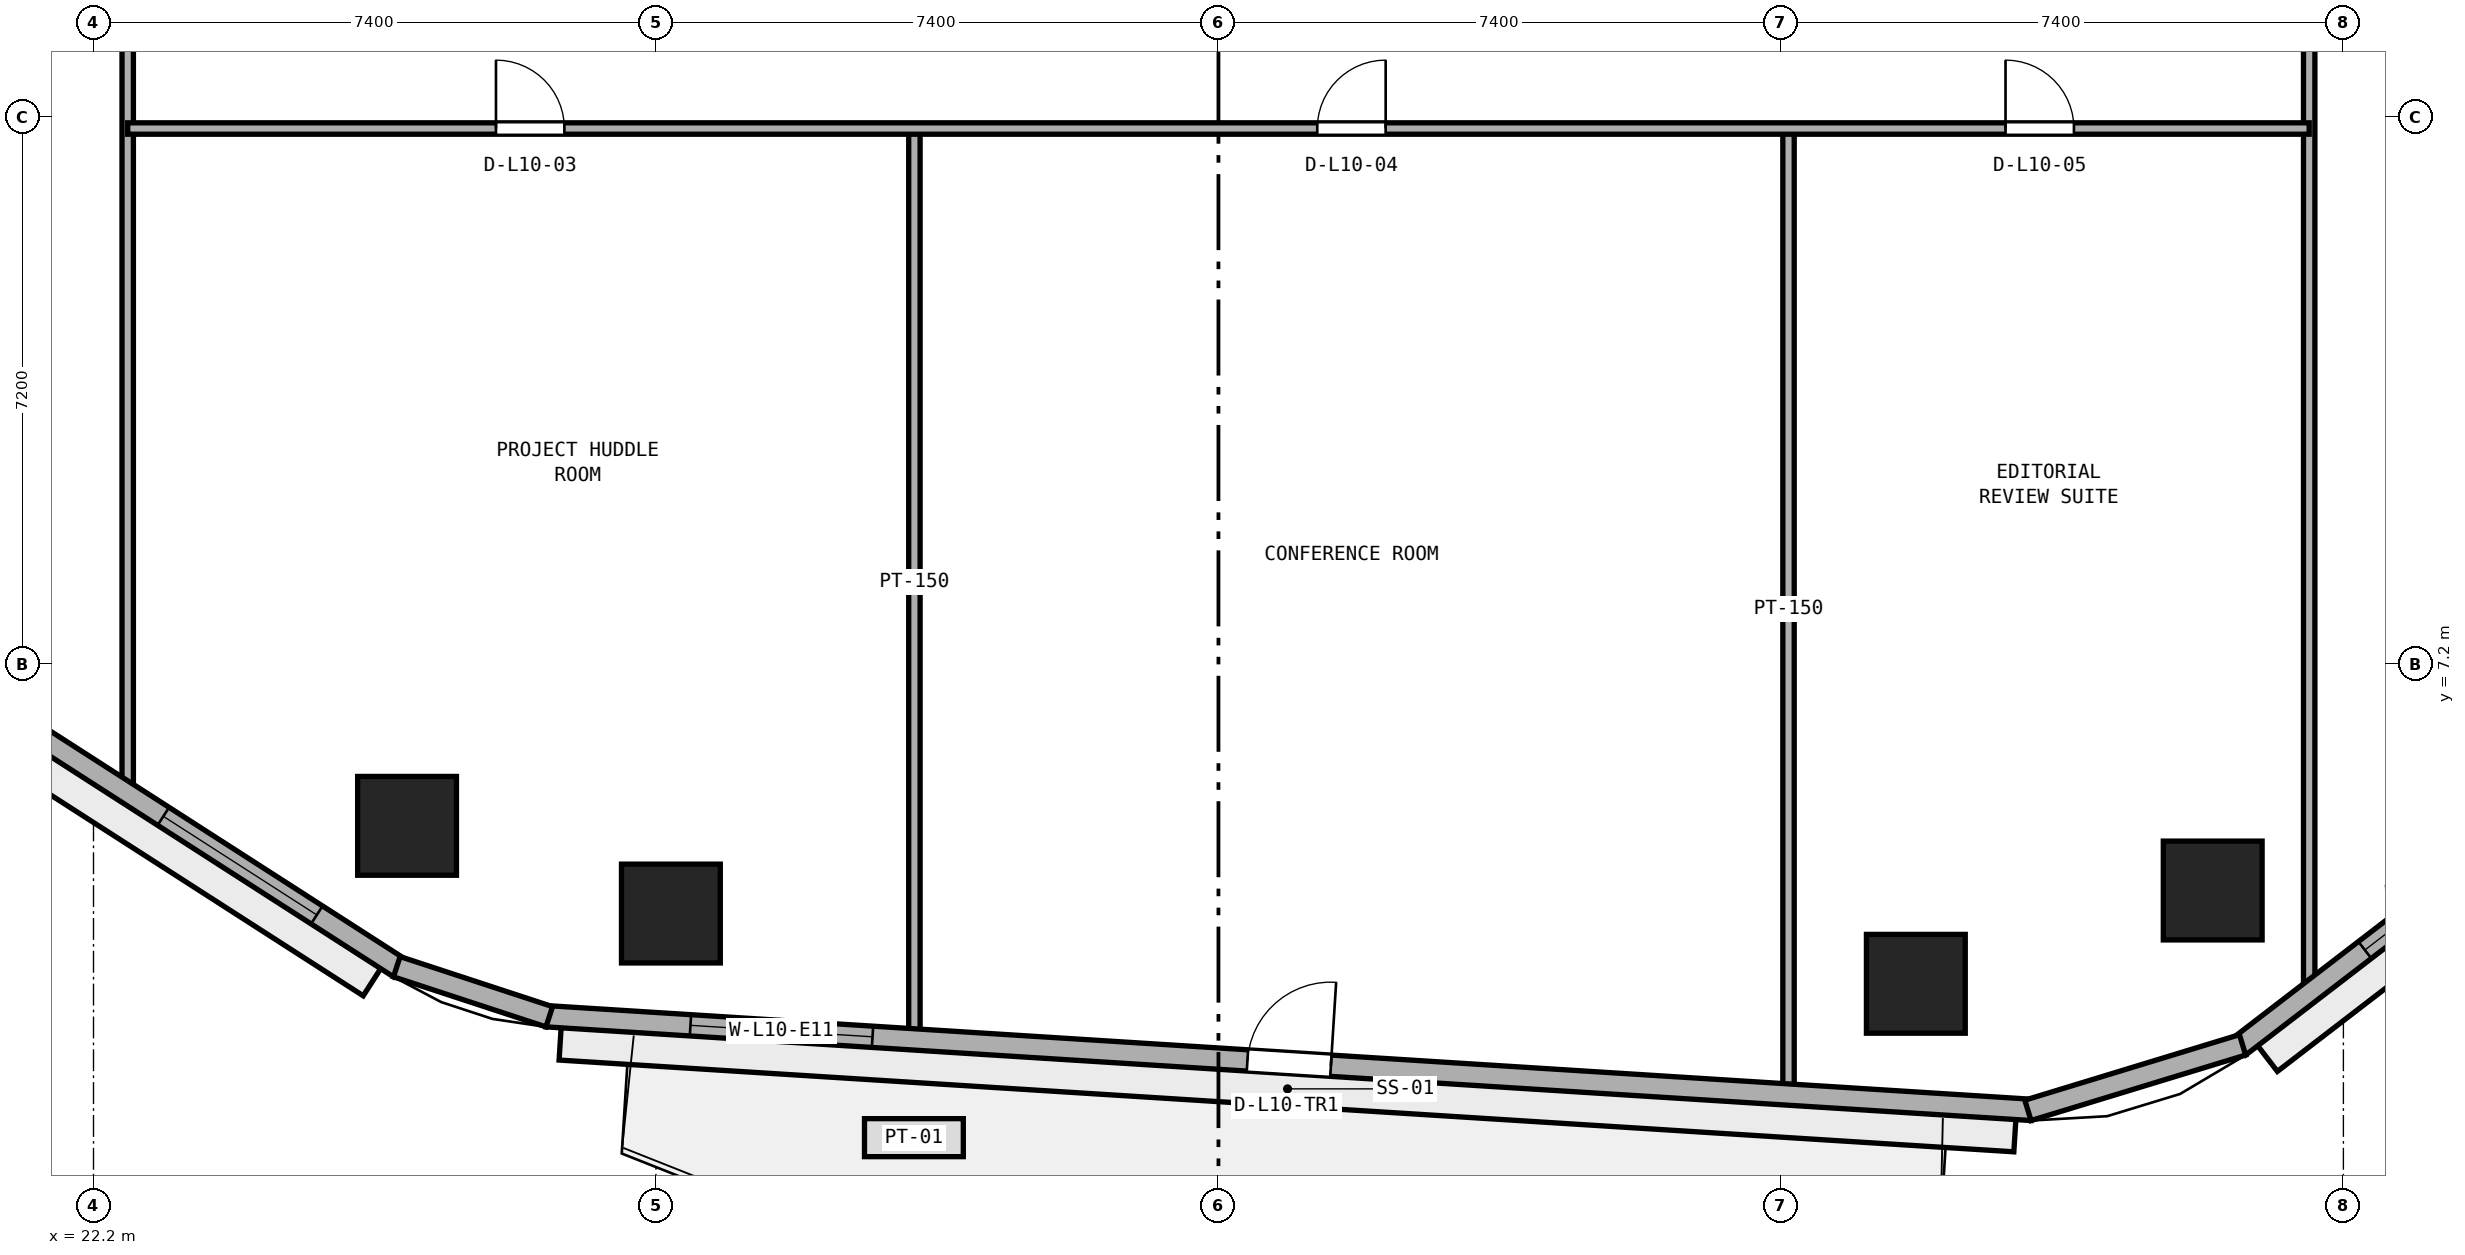
"""IFC4 building model, lengths in metres.
Left out: names, types, materials, properties, quantities, classifications, styles, units other than length and angle.
Written with IfcOpenShell. Run it as: python <this file> out.ifc"""

import sys

from ifc_helpers import new_model, si_unit, direction, frame, frame_2d, origin, origin_2d, place, context, subcontext, project, spatial, rectangle, extrude, element, fill, save


model = new_model("IFC4")
c1 = context("Model", 3, precision=1e-05, world=origin(), true_north=direction((0.0, 1.0)))
c2 = subcontext(c1, "Body", "Model", "MODEL_VIEW")
j1 = project(units=[si_unit("LENGTHUNIT", "METRE"), si_unit("PLANEANGLEUNIT", "RADIAN")], contexts=[c1])
p1 = place(None, origin())
s1 = spatial("IfcSite", under=j1, at=p1, CompositionType="ELEMENT")
p2 = place(p1, origin())
s2 = spatial("IfcBuilding", under=s1, at=p2, CompositionType="ELEMENT")
p3 = place(p2, frame((0.0, 0.0, 44.0)))
s3 = spatial("IfcBuildingStorey", under=s2, at=p3, CompositionType="ELEMENT", Elevation=44.0)
for number, where, z_axis, x_axis in (
    (1, (29.796, 3.922, 0.0), (0.0, 0.0, 1.0), (1.0, 0.0, 0.0)),
    (2, (46.175, 2.998, 0.0), (0.0, 0.0, 1.0), (1.0, 0.0, 0.0)),
    (3, (50.081, 4.225, 0.0), (0.0, 0.0, 1.0), (1.0, 0.0, 0.0)),
    (4, (26.325, 5.076, 0.0), (0.0, 0.0, 1.0), (1.0, 0.0, 0.0)),
):
    element("IfcColumn", number, at=place(p3, frame(where, z_axis=z_axis, x_axis=x_axis)), inside=s3, PredefinedType="COLUMN", context=c2, shape_type="SweptSolid", body=[
        extrude(rectangle(XDim=1.3, YDim=1.3, at=origin_2d()), origin(), (0.0, 0.0, 1.0), 3.8),
    ])
p4 = place(p3, frame((51.35, 2.843, 0.0), z_axis=(0.0, 0.0, 1.0), x_axis=(0.0, 1.0, 0.0)))
e5 = element("IfcWall", 5, at=p4, inside=s3, PredefinedType="PARTITIONING", context=c2, shape_type="SweptSolid", body=[
    extrude(rectangle(XDim=44.892, YDim=0.15, at=frame_2d((22.446, 0.0))), origin(), (0.0, 0.0, 1.0), 3.525),
])
p5 = place(p4, frame((21.907, 0.0, 0.0)))
e6 = element("IfcOpeningElement", 6, at=p5, cuts=e5, PredefinedType="OPENING", context=c2, shape_type="SweptSolid", body=[
    extrude(rectangle(XDim=0.9, YDim=2.1, at=frame_2d((0.45, 1.05))), frame((0.0, 0.085, 0.0), z_axis=(0.0, -1.0, 0.0), x_axis=(1.0, 0.0, 0.0)), (0.0, 0.0, 1.0), 0.17),
])
p6 = place(p3, frame((44.5, 1.605, 0.0), z_axis=(0.0, 0.0, 1.0), x_axis=(0.0, 1.0, 0.0)))
e7 = element("IfcWall", 7, at=p6, inside=s3, PredefinedType="PARTITIONING", context=c2, shape_type="SweptSolid", body=[
    extrude(rectangle(XDim=12.645, YDim=0.15, at=frame_2d((6.322, 0.0))), origin(), (0.0, 0.0, 1.0), 3.525),
])
p7 = place(p3, frame((33.0, 2.331, 0.0), z_axis=(0.0, 0.0, 1.0), x_axis=(0.0, 1.0, 0.0)))
e8 = element("IfcWall", 8, at=p7, inside=s3, PredefinedType="PARTITIONING", context=c2, shape_type="SweptSolid", body=[
    extrude(rectangle(XDim=11.919, YDim=0.15, at=frame_2d((5.959, 0.0))), origin(), (0.0, 0.0, 1.0), 3.525),
])
p8 = place(p3, frame((22.65, 5.476, 0.0), z_axis=(0.0, 0.0, 1.0), x_axis=(0.0, 1.0, 0.0)))
e9 = element("IfcWall", 9, at=p8, inside=s3, PredefinedType="PARTITIONING", context=c2, shape_type="SweptSolid", body=[
    extrude(rectangle(XDim=39.221, YDim=0.15, at=frame_2d((19.61, 0.0))), origin(), (0.0, 0.0, 1.0), 3.525),
])
p9 = place(p8, frame((11.199, 0.0, 0.0)))
e10 = element("IfcOpeningElement", 10, at=p9, cuts=e9, PredefinedType="OPENING", context=c2, shape_type="SweptSolid", body=[
    extrude(rectangle(XDim=0.9, YDim=2.1, at=frame_2d((0.45, 1.05))), frame((0.0, 0.085, 0.0), z_axis=(0.0, -1.0, 0.0), x_axis=(1.0, 0.0, 0.0)), (0.0, 0.0, 1.0), 0.17),
])
p10 = place(p8, frame((17.824, 0.0, 0.0)))
e11 = element("IfcOpeningElement", 11, at=p10, cuts=e9, PredefinedType="OPENING", context=c2, shape_type="SweptSolid", body=[
    extrude(rectangle(XDim=0.9, YDim=2.1, at=frame_2d((0.45, 1.05))), frame((0.0, 0.085, 0.0), z_axis=(0.0, -1.0, 0.0), x_axis=(1.0, 0.0, 0.0)), (0.0, 0.0, 1.0), 0.17),
])
p11 = place(p8, frame((25.899, 0.0, 0.0)))
e12 = element("IfcOpeningElement", 12, at=p11, cuts=e9, PredefinedType="OPENING", context=c2, shape_type="SweptSolid", body=[
    extrude(rectangle(XDim=0.9, YDim=2.1, at=frame_2d((0.45, 1.05))), frame((0.0, 0.085, 0.0), z_axis=(0.0, -1.0, 0.0), x_axis=(1.0, 0.0, 0.0)), (0.0, 0.0, 1.0), 0.17),
])
p12 = place(p3, frame((22.65, 14.25, 0.0), z_axis=(0.0, 0.0, 1.0), x_axis=(1.0, 0.0, 0.0)))
e13 = element("IfcWall", 13, at=p12, inside=s3, PredefinedType="PARTITIONING", context=c2, shape_type="SweptSolid", body=[
    extrude(rectangle(XDim=28.7, YDim=0.15, at=frame_2d((14.35, 0.0))), origin(), (0.0, 0.0, 1.0), 3.525),
])
p13 = place(p12, frame((4.845, 0.0, 0.0)))
e14 = element("IfcOpeningElement", 14, at=p13, cuts=e13, PredefinedType="OPENING", context=c2, shape_type="SweptSolid", body=[
    extrude(rectangle(XDim=0.9, YDim=2.1, at=frame_2d((0.45, 1.05))), frame((0.0, 0.085, 0.0), z_axis=(0.0, -1.0, 0.0), x_axis=(1.0, 0.0, 0.0)), (0.0, 0.0, 1.0), 0.17),
])
p14 = place(p12, frame((15.65, 0.0, 0.0)))
e15 = element("IfcOpeningElement", 15, at=p14, cuts=e13, PredefinedType="OPENING", context=c2, shape_type="SweptSolid", body=[
    extrude(rectangle(XDim=0.9, YDim=2.1, at=frame_2d((0.45, 1.05))), frame((0.0, 0.085, 0.0), z_axis=(0.0, -1.0, 0.0), x_axis=(1.0, 0.0, 0.0)), (0.0, 0.0, 1.0), 0.17),
])
p15 = place(p12, frame((24.705, 0.0, 0.0)))
e16 = element("IfcOpeningElement", 16, at=p15, cuts=e13, PredefinedType="OPENING", context=c2, shape_type="SweptSolid", body=[
    extrude(rectangle(XDim=0.9, YDim=2.1, at=frame_2d((0.45, 1.05))), frame((0.0, 0.085, 0.0), z_axis=(0.0, -1.0, 0.0), x_axis=(1.0, 0.0, 0.0)), (0.0, 0.0, 1.0), 0.17),
])
p16 = place(p3, frame((28.161, 2.571, 0.0), z_axis=(0.0, 0.0, 1.0), x_axis=(0.998017288298, -0.06294038654, 0.0)))
e17 = element("IfcWall", 17, at=p16, inside=s3, PredefinedType="STANDARD", context=c2, shape_type="SweptSolid", body=[
    extrude(rectangle(XDim=19.577, YDim=0.28, at=frame_2d((9.789, 0.0))), origin(), (0.0, 0.0, 1.0), 3.525),
])
p17 = place(p16, frame((9.239, 0.0, 0.0)))
e18 = element("IfcOpeningElement", 18, at=p17, cuts=e17, PredefinedType="OPENING", context=c2, shape_type="SweptSolid", body=[
    extrude(rectangle(XDim=1.1, YDim=2.2, at=frame_2d((0.55, 1.1))), frame((0.0, 0.15, 0.0), z_axis=(0.0, -1.0, 0.0), x_axis=(1.0, 0.0, 0.0)), (0.0, 0.0, 1.0), 0.3),
])
p18 = place(p16, frame((1.896, 0.0, 0.9)))
e19 = element("IfcOpeningElement", 19, at=p18, cuts=e17, PredefinedType="OPENING", context=c2, shape_type="SweptSolid", body=[
    extrude(rectangle(XDim=2.4, YDim=1.75, at=frame_2d((1.2, 0.875))), frame((0.0, 0.15, 0.0), z_axis=(0.0, -1.0, 0.0), x_axis=(1.0, 0.0, 0.0)), (0.0, 0.0, 1.0), 0.3),
])
p19 = place(p3, frame((50.429, 2.172, 0.0), z_axis=(0.0, 0.0, 1.0), x_axis=(0.792937466367, 0.609303023488, 0.0)))
e20 = element("IfcWall", 20, at=p19, inside=s3, PredefinedType="STANDARD", context=c2, shape_type="SweptSolid", body=[
    extrude(rectangle(XDim=17.713, YDim=0.28, at=frame_2d((8.856, 0.0))), origin(), (0.0, 0.0, 1.0), 3.525),
])
p20 = place(p19, frame((2.085, 0.0, 0.9)))
e21 = element("IfcOpeningElement", 21, at=p20, cuts=e20, PredefinedType="OPENING", context=c2, shape_type="SweptSolid", body=[
    extrude(rectangle(XDim=2.4, YDim=1.75, at=frame_2d((1.2, 0.875))), frame((0.0, 0.15, 0.0), z_axis=(0.0, -1.0, 0.0), x_axis=(1.0, 0.0, 0.0)), (0.0, 0.0, 1.0), 0.3),
])
p21 = place(p19, frame((7.656, 0.0, 0.9)))
e22 = element("IfcOpeningElement", 22, at=p21, cuts=e20, PredefinedType="OPENING", context=c2, shape_type="SweptSolid", body=[
    extrude(rectangle(XDim=2.4, YDim=1.75, at=frame_2d((1.2, 0.875))), frame((0.0, 0.15, 0.0), z_axis=(0.0, -1.0, 0.0), x_axis=(1.0, 0.0, 0.0)), (0.0, 0.0, 1.0), 0.3),
])
p22 = place(p19, frame((13.227, 0.0, 0.9)))
e23 = element("IfcOpeningElement", 23, at=p22, cuts=e20, PredefinedType="OPENING", context=c2, shape_type="SweptSolid", body=[
    extrude(rectangle(XDim=2.4, YDim=1.75, at=frame_2d((1.2, 0.875))), frame((0.0, 0.15, 0.0), z_axis=(0.0, -1.0, 0.0), x_axis=(1.0, 0.0, 0.0)), (0.0, 0.0, 1.0), 0.3),
])
p23 = place(p3, frame((11.405, 12.728, 0.0), z_axis=(0.0, 0.0, 1.0), x_axis=(0.841304564637, -0.540561402175, 0.0)))
e24 = element("IfcWall", 24, at=p23, inside=s3, PredefinedType="STANDARD", context=c2, shape_type="SweptSolid", body=[
    extrude(rectangle(XDim=17.612, YDim=0.28, at=frame_2d((8.806, 0.0))), origin(), (0.0, 0.0, 1.0), 3.525),
])
p24 = place(p23, frame((2.069, 0.0, 0.9)))
e25 = element("IfcOpeningElement", 25, at=p24, cuts=e24, PredefinedType="OPENING", context=c2, shape_type="SweptSolid", body=[
    extrude(rectangle(XDim=2.4, YDim=1.75, at=frame_2d((1.2, 0.875))), frame((0.0, 0.15, 0.0), z_axis=(0.0, -1.0, 0.0), x_axis=(1.0, 0.0, 0.0)), (0.0, 0.0, 1.0), 0.3),
])
p25 = place(p23, frame((7.606, 0.0, 0.9)))
e26 = element("IfcOpeningElement", 26, at=p25, cuts=e24, PredefinedType="OPENING", context=c2, shape_type="SweptSolid", body=[
    extrude(rectangle(XDim=2.4, YDim=1.75, at=frame_2d((1.2, 0.875))), frame((0.0, 0.15, 0.0), z_axis=(0.0, -1.0, 0.0), x_axis=(1.0, 0.0, 0.0)), (0.0, 0.0, 1.0), 0.3),
])
p26 = place(p23, frame((13.923, 0.0, 0.9)))
e27 = element("IfcOpeningElement", 27, at=p26, cuts=e24, PredefinedType="OPENING", context=c2, shape_type="SweptSolid", body=[
    extrude(rectangle(XDim=2.4, YDim=1.75, at=frame_2d((1.2, 0.875))), frame((0.0, 0.15, 0.0), z_axis=(0.0, -1.0, 0.0), x_axis=(1.0, 0.0, 0.0)), (0.0, 0.0, 1.0), 0.3),
])
p27 = place(p3, frame((47.65, 1.333, 0.0), z_axis=(0.0, 0.0, 1.0), x_axis=(0.956461287977, 0.291859220516, 0.0)))
e28 = element("IfcWall", 28, at=p27, inside=s3, PredefinedType="STANDARD", context=c2, shape_type="SweptSolid", body=[
    extrude(rectangle(XDim=2.952, YDim=0.28, at=frame_2d((1.476, 0.0))), origin(), (0.0, 0.0, 1.0), 3.525),
])
p28 = place(p3, frame((26.19, 3.223, 0.0), z_axis=(0.0, 0.0, 1.0), x_axis=(0.95016442175, -0.311749212734, 0.0)))
e29 = element("IfcWall", 29, at=p28, inside=s3, PredefinedType="STANDARD", context=c2, shape_type="SweptSolid", body=[
    extrude(rectangle(XDim=2.111, YDim=0.28, at=frame_2d((1.056, 0.0))), origin(), (0.0, 0.0, 1.0), 3.525),
])
p29 = place(p13, origin())
e30 = element("IfcDoor", 30, at=p29, inside=s3, OperationType="SINGLE_SWING_LEFT", PredefinedType="DOOR", context=c2, shape_type="SweptSolid", body=[
    extrude(rectangle(XDim=0.9, YDim=2.1, at=frame_2d((0.45, 1.05))), frame((0.0, 0.025, 0.0), z_axis=(0.0, -1.0, 0.0), x_axis=(1.0, 0.0, 0.0)), (0.0, 0.0, 1.0), 0.05),
])
fill(e14, e30)
p30 = place(p14, origin())
e31 = element("IfcDoor", 31, at=p30, inside=s3, OperationType="SINGLE_SWING_RIGHT", PredefinedType="DOOR", context=c2, shape_type="SweptSolid", body=[
    extrude(rectangle(XDim=0.9, YDim=2.1, at=frame_2d((0.45, 1.05))), frame((0.0, 0.025, 0.0), z_axis=(0.0, -1.0, 0.0), x_axis=(1.0, 0.0, 0.0)), (0.0, 0.0, 1.0), 0.05),
])
fill(e15, e31)
p31 = place(p15, origin())
e32 = element("IfcDoor", 32, at=p31, inside=s3, OperationType="SINGLE_SWING_LEFT", PredefinedType="DOOR", context=c2, shape_type="SweptSolid", body=[
    extrude(rectangle(XDim=0.9, YDim=2.1, at=frame_2d((0.45, 1.05))), frame((0.0, 0.025, 0.0), z_axis=(0.0, -1.0, 0.0), x_axis=(1.0, 0.0, 0.0)), (0.0, 0.0, 1.0), 0.05),
])
fill(e16, e32)
p32 = place(p17, origin())
e33 = element("IfcDoor", 33, at=p32, inside=s3, OperationType="SINGLE_SWING_RIGHT", PredefinedType="DOOR", context=c2, shape_type="SweptSolid", body=[
    extrude(rectangle(XDim=1.1, YDim=2.2, at=frame_2d((0.55, 1.1))), frame((0.0, 0.025, 0.0), z_axis=(0.0, -1.0, 0.0), x_axis=(1.0, 0.0, 0.0)), (0.0, 0.0, 1.0), 0.05),
])
fill(e18, e33)
p33 = place(p18, origin())
e34 = element("IfcWindow", 34, at=p33, inside=s3, PartitioningType="SINGLE_PANEL", PredefinedType="WINDOW", context=c2, shape_type="SweptSolid", body=[
    extrude(rectangle(XDim=2.4, YDim=1.75, at=frame_2d((1.2, 0.875))), frame((0.0, 0.03, 0.0), z_axis=(0.0, -1.0, 0.0), x_axis=(1.0, 0.0, 0.0)), (0.0, 0.0, 1.0), 0.06),
])
fill(e19, e34)
p34 = place(p20, origin())
e35 = element("IfcWindow", 35, at=p34, inside=s3, PartitioningType="SINGLE_PANEL", PredefinedType="WINDOW", context=c2, shape_type="SweptSolid", body=[
    extrude(rectangle(XDim=2.4, YDim=1.75, at=frame_2d((1.2, 0.875))), frame((0.0, 0.03, 0.0), z_axis=(0.0, -1.0, 0.0), x_axis=(1.0, 0.0, 0.0)), (0.0, 0.0, 1.0), 0.06),
])
fill(e21, e35)
p35 = place(p26, origin())
e36 = element("IfcWindow", 36, at=p35, inside=s3, PartitioningType="SINGLE_PANEL", PredefinedType="WINDOW", context=c2, shape_type="SweptSolid", body=[
    extrude(rectangle(XDim=2.4, YDim=1.75, at=frame_2d((1.2, 0.875))), frame((0.0, 0.03, 0.0), z_axis=(0.0, -1.0, 0.0), x_axis=(1.0, 0.0, 0.0)), (0.0, 0.0, 1.0), 0.06),
])
fill(e27, e36)
save(model, sys.argv[1])
